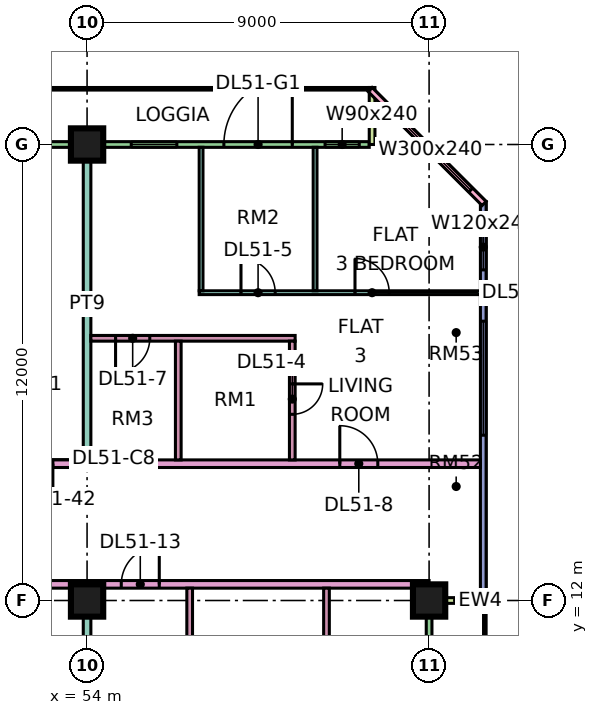
"""IFC4 building model, lengths in metres.
Left out: names, types, materials, properties, quantities, classifications, styles, units other than length and angle.
Written with IfcOpenShell. Run it as: python <this file> out.ifc"""

import sys

from ifc_helpers import new_model, si_unit, direction, frame, frame_2d, origin, origin_2d, place, context, subcontext, project, spatial, rectangle, extrude, element, fill, save


model = new_model("IFC4")
c1 = context("Model", 3, precision=1e-05, world=origin(), true_north=direction((0.0, 1.0)))
c2 = subcontext(c1, "Body", "Model", "MODEL_VIEW")
j1 = project(units=[si_unit("LENGTHUNIT", "METRE"), si_unit("PLANEANGLEUNIT", "RADIAN")], contexts=[c1])
p1 = place(None, origin())
s1 = spatial("IfcSite", under=j1, at=p1, CompositionType="ELEMENT")
p2 = place(p1, origin())
s2 = spatial("IfcBuilding", under=s1, at=p2, CompositionType="ELEMENT")
p3 = place(p2, frame((0.0, 0.0, 219.15)))
s3 = spatial("IfcBuildingStorey", under=s2, at=p3, CompositionType="ELEMENT", Elevation=219.15)
for number, where, z_axis, x_axis in (
    (1, (54.0, 12.0, 0.0), (0.0, 0.0, 1.0), (1.0, 0.0, 0.0)),
    (2, (54.0, 24.0, 0.0), (0.0, 0.0, 1.0), (1.0, 0.0, 0.0)),
    (3, (63.0, 12.0, 0.0), (0.0, 0.0, 1.0), (1.0, 0.0, 0.0)),
):
    element("IfcColumn", number, at=place(p3, frame(where, z_axis=z_axis, x_axis=x_axis)), inside=s3, PredefinedType="COLUMN", context=c2, shape_type="SweptSolid", body=[
        extrude(rectangle(XDim=0.85, YDim=0.85, at=origin_2d()), origin(), (0.0, 0.0, 1.0), 3.75),
    ])
p4 = place(p3, frame((61.425, 24.0, 0.0), z_axis=(0.0, 0.0, 1.0), x_axis=(-1.0, 0.0, 0.0)))
e4 = element("IfcWall", 4, at=p4, inside=s3, PredefinedType="SOLIDWALL", context=c2, shape_type="SweptSolid", body=[
    extrude(rectangle(XDim=13.35, YDim=0.15, at=frame_2d((6.675, 0.0))), origin(), (0.0, 0.0, 1.0), 3.35),
])
p5 = place(p4, frame((0.262, 0.0, 0.45)))
e5 = element("IfcOpeningElement", 5, at=p5, cuts=e4, PredefinedType="OPENING", context=c2, shape_type="SweptSolid", body=[
    extrude(rectangle(XDim=0.9, YDim=2.4, at=frame_2d((0.45, 1.2))), frame((0.0, 0.085, 0.0), z_axis=(0.0, -1.0, 0.0), x_axis=(1.0, 0.0, 0.0)), (0.0, 0.0, 1.0), 0.17),
])
p6 = place(p4, frame((2.025, 0.0, 0.0)))
e6 = element("IfcOpeningElement", 6, at=p6, cuts=e4, PredefinedType="OPENING", context=c2, shape_type="SweptSolid", body=[
    extrude(rectangle(XDim=1.8, YDim=2.4, at=frame_2d((0.9, 1.2))), frame((0.0, 0.085, 0.0), z_axis=(0.0, -1.0, 0.0), x_axis=(1.0, 0.0, 0.0)), (0.0, 0.0, 1.0), 0.17),
])
p7 = place(p4, frame((5.062, 0.0, 0.45)))
e7 = element("IfcOpeningElement", 7, at=p7, cuts=e4, PredefinedType="OPENING", context=c2, shape_type="SweptSolid", body=[
    extrude(rectangle(XDim=1.2, YDim=2.4, at=frame_2d((0.6, 1.2))), frame((0.0, 0.085, 0.0), z_axis=(0.0, -1.0, 0.0), x_axis=(1.0, 0.0, 0.0)), (0.0, 0.0, 1.0), 0.17),
])
p8 = place(p4, frame((8.55, 0.0, 0.45)))
e8 = element("IfcOpeningElement", 8, at=p8, cuts=e4, PredefinedType="OPENING", context=c2, shape_type="SweptSolid", body=[
    extrude(rectangle(XDim=4.2, YDim=2.4, at=frame_2d((2.1, 1.2))), frame((0.0, 0.085, 0.0), z_axis=(0.0, -1.0, 0.0), x_axis=(1.0, 0.0, 0.0)), (0.0, 0.0, 1.0), 0.17),
])
p9 = place(p3, frame((61.5, 25.5, 0.0), z_axis=(0.0, 0.0, 1.0), x_axis=(0.0, -1.0, 0.0)))
e9 = element("IfcWall", 9, at=p9, inside=s3, PredefinedType="SOLIDWALL", context=c2, shape_type="SweptSolid", body=[
    extrude(rectangle(XDim=1.5, YDim=0.15, at=frame_2d((0.75, 0.0))), origin(), (0.0, 0.0, 1.0), 3.35),
])
p10 = place(p3, frame((63.0, 1.575, 0.0), z_axis=(0.0, 0.0, 1.0), x_axis=(0.0, 1.0, 0.0)))
e10 = element("IfcWall", 10, at=p10, inside=s3, PredefinedType="SOLIDWALL", context=c2, shape_type="SweptSolid", body=[
    extrude(rectangle(XDim=10.35, YDim=0.15, at=frame_2d((5.175, 0.0))), origin(), (0.0, 0.0, 1.0), 3.35),
])
p11 = place(p10, frame((1.825, 0.0, 0.0)))
e11 = element("IfcOpeningElement", 11, at=p11, cuts=e10, PredefinedType="OPENING", context=c2, shape_type="SweptSolid", body=[
    extrude(rectangle(XDim=1.8, YDim=2.4, at=frame_2d((0.9, 1.2))), frame((0.0, 0.085, 0.0), z_axis=(0.0, -1.0, 0.0), x_axis=(1.0, 0.0, 0.0)), (0.0, 0.0, 1.0), 0.17),
])
p12 = place(p10, frame((7.075, 0.0, 0.45)))
e12 = element("IfcOpeningElement", 12, at=p12, cuts=e10, PredefinedType="OPENING", context=c2, shape_type="SweptSolid", body=[
    extrude(rectangle(XDim=2.4, YDim=2.4, at=frame_2d((1.2, 1.2))), frame((0.0, 0.085, 0.0), z_axis=(0.0, -1.0, 0.0), x_axis=(1.0, 0.0, 0.0)), (0.0, 0.0, 1.0), 0.17),
])
p13 = place(p3, frame((64.5, 12.0, 0.0), z_axis=(0.0, 0.0, 1.0), x_axis=(-1.0, 0.0, 0.0)))
e13 = element("IfcWall", 13, at=p13, inside=s3, PredefinedType="SOLIDWALL", context=c2, shape_type="SweptSolid", body=[
    extrude(rectangle(XDim=1.5, YDim=0.15, at=frame_2d((0.75, 0.0))), origin(), (0.0, 0.0, 1.0), 3.35),
])
p14 = place(p3, frame((64.425, 12.075, 0.0), z_axis=(0.0, 0.0, 1.0), x_axis=(0.0, 1.0, 0.0)))
e14 = element("IfcWall", 14, at=p14, inside=s3, PredefinedType="SOLIDWALL", context=c2, shape_type="SweptSolid", body=[
    extrude(rectangle(XDim=10.425, YDim=0.15, at=frame_2d((5.212, 0.0))), origin(), (0.0, 0.0, 1.0), 3.35),
])
p15 = place(p14, frame((4.275, 0.0, 0.45)))
e15 = element("IfcOpeningElement", 15, at=p15, cuts=e14, PredefinedType="OPENING", context=c2, shape_type="SweptSolid", body=[
    extrude(rectangle(XDim=3.0, YDim=2.4, at=frame_2d((1.5, 1.2))), frame((0.0, 0.085, 0.0), z_axis=(0.0, -1.0, 0.0), x_axis=(1.0, 0.0, 0.0)), (0.0, 0.0, 1.0), 0.17),
])
p16 = place(p14, frame((8.625, 0.0, 0.45)))
e16 = element("IfcOpeningElement", 16, at=p16, cuts=e14, PredefinedType="OPENING", context=c2, shape_type="SweptSolid", body=[
    extrude(rectangle(XDim=1.2, YDim=2.4, at=frame_2d((0.6, 1.2))), frame((0.0, 0.085, 0.0), z_axis=(0.0, -1.0, 0.0), x_axis=(1.0, 0.0, 0.0)), (0.0, 0.0, 1.0), 0.17),
])
p17 = place(p3, frame((64.447, 22.447, 0.0), z_axis=(0.0, 0.0, 1.0), x_axis=(-0.707106781187, 0.707106781187, 0.0)))
e17 = element("IfcWall", 17, at=p17, inside=s3, PredefinedType="SOLIDWALL", context=c2, shape_type="SweptSolid", body=[
    extrude(rectangle(XDim=4.243, YDim=0.15, at=frame_2d((2.121, 0.0))), origin(), (0.0, 0.0, 1.0), 3.35),
])
p18 = place(p17, frame((0.498, 0.0, 0.45)))
e18 = element("IfcOpeningElement", 18, at=p18, cuts=e17, PredefinedType="OPENING", context=c2, shape_type="SweptSolid", body=[
    extrude(rectangle(XDim=3.0, YDim=2.4, at=frame_2d((1.5, 1.2))), frame((0.0, 0.085, 0.0), z_axis=(0.0, -1.0, 0.0), x_axis=(1.0, 0.0, 0.0)), (0.0, 0.0, 1.0), 0.17),
])
p19 = place(p3, frame((40.65, 12.425, 0.0), z_axis=(0.0, 0.0, 1.0), x_axis=(1.0, 0.0, 0.0)))
e19 = element("IfcWall", 19, at=p19, inside=s3, PredefinedType="PARTITIONING", context=c2, shape_type="SweptSolid", body=[
    extrude(rectangle(XDim=22.35, YDim=0.2, at=frame_2d((11.175, 0.0))), origin(), (0.0, 0.0, 1.0), 3.35),
])
p20 = place(p19, frame((14.25, 0.0, 0.0)))
e20 = element("IfcOpeningElement", 20, at=p20, cuts=e19, PredefinedType="OPENING", context=c2, shape_type="SweptSolid", body=[
    extrude(rectangle(XDim=1.0, YDim=2.1, at=frame_2d((0.5, 1.05))), frame((0.0, 0.11, 0.0), z_axis=(0.0, -1.0, 0.0), x_axis=(1.0, 0.0, 0.0)), (0.0, 0.0, 1.0), 0.22),
])
p21 = place(p19, frame((1.05, 0.0, 0.0)))
e21 = element("IfcOpeningElement", 21, at=p21, cuts=e19, PredefinedType="OPENING", context=c2, shape_type="SweptSolid", body=[
    extrude(rectangle(XDim=1.0, YDim=2.1, at=frame_2d((0.5, 1.05))), frame((0.0, 0.11, 0.0), z_axis=(0.0, -1.0, 0.0), x_axis=(1.0, 0.0, 0.0)), (0.0, 0.0, 1.0), 0.22),
])
p22 = place(p3, frame((51.225, 15.6, 0.0), z_axis=(0.0, 0.0, 1.0), x_axis=(1.0, 0.0, 0.0)))
e22 = element("IfcWall", 22, at=p22, inside=s3, PredefinedType="PARTITIONING", context=c2, shape_type="SweptSolid", body=[
    extrude(rectangle(XDim=13.125, YDim=0.2, at=frame_2d((6.562, 0.0))), origin(), (0.0, 0.0, 1.0), 3.35),
])
p23 = place(p22, frame((9.425, 0.0, 0.0)))
e23 = element("IfcOpeningElement", 23, at=p23, cuts=e22, PredefinedType="OPENING", context=c2, shape_type="SweptSolid", body=[
    extrude(rectangle(XDim=1.0, YDim=2.1, at=frame_2d((0.5, 1.05))), frame((0.0, 0.11, 0.0), z_axis=(0.0, -1.0, 0.0), x_axis=(1.0, 0.0, 0.0)), (0.0, 0.0, 1.0), 0.22),
])
p24 = place(p22, frame((0.875, 0.0, 0.0)))
e24 = element("IfcOpeningElement", 24, at=p24, cuts=e22, PredefinedType="OPENING", context=c2, shape_type="SweptSolid", body=[
    extrude(rectangle(XDim=1.0, YDim=2.1, at=frame_2d((0.5, 1.05))), frame((0.0, 0.11, 0.0), z_axis=(0.0, -1.0, 0.0), x_axis=(1.0, 0.0, 0.0)), (0.0, 0.0, 1.0), 0.22),
])
p25 = place(p3, frame((54.0, 0.074, 0.0), z_axis=(0.0, 0.0, 1.0), x_axis=(0.0, 1.0, 0.0)))
e25 = element("IfcWall", 25, at=p25, inside=s3, PredefinedType="PARTITIONING", context=c2, shape_type="SweptSolid", body=[
    extrude(rectangle(XDim=12.251, YDim=0.2, at=frame_2d((6.125, 0.0))), origin(), (0.0, 0.0, 1.0), 3.35),
])
p26 = place(p3, frame((54.0, 15.7, 0.0), z_axis=(0.0, 0.0, 1.0), x_axis=(0.0, 1.0, 0.0)))
e26 = element("IfcWall", 26, at=p26, inside=s3, PredefinedType="PARTITIONING", context=c2, shape_type="SweptSolid", body=[
    extrude(rectangle(XDim=8.226, YDim=0.2, at=frame_2d((4.113, 0.0))), origin(), (0.0, 0.0, 1.0), 3.35),
])
p27 = place(p3, frame((54.1, 18.9, 0.0), z_axis=(0.0, 0.0, 1.0), x_axis=(1.0, 0.0, 0.0)))
e27 = element("IfcWall", 27, at=p27, inside=s3, PredefinedType="PARTITIONING", context=c2, shape_type="SweptSolid", body=[
    extrude(rectangle(XDim=5.375, YDim=0.15, at=frame_2d((2.688, 0.0))), origin(), (0.0, 0.0, 1.0), 3.35),
])
p28 = place(p27, frame((0.65, 0.0, 0.0)))
e28 = element("IfcOpeningElement", 28, at=p28, cuts=e27, PredefinedType="OPENING", context=c2, shape_type="SweptSolid", body=[
    extrude(rectangle(XDim=0.9, YDim=2.1, at=frame_2d((0.45, 1.05))), frame((0.0, 0.085, 0.0), z_axis=(0.0, -1.0, 0.0), x_axis=(1.0, 0.0, 0.0)), (0.0, 0.0, 1.0), 0.17),
])
p29 = place(p3, frame((56.4, 15.7, 0.0), z_axis=(0.0, 0.0, 1.0), x_axis=(0.0, 1.0, 0.0)))
e29 = element("IfcWall", 29, at=p29, inside=s3, PredefinedType="PARTITIONING", context=c2, shape_type="SweptSolid", body=[
    extrude(rectangle(XDim=3.125, YDim=0.15, at=frame_2d((1.562, 0.0))), origin(), (0.0, 0.0, 1.0), 3.35),
])
p30 = place(p3, frame((56.7, 8.3, 0.0), z_axis=(0.0, 0.0, 1.0), x_axis=(0.0, 1.0, 0.0)))
e30 = element("IfcWall", 30, at=p30, inside=s3, PredefinedType="PARTITIONING", context=c2, shape_type="SweptSolid", body=[
    extrude(rectangle(XDim=4.025, YDim=0.15, at=frame_2d((2.012, 0.0))), origin(), (0.0, 0.0, 1.0), 3.35),
])
p31 = place(p3, frame((56.95, 20.1, 0.0), z_axis=(0.0, 0.0, 1.0), x_axis=(1.0, 0.0, 0.0)))
e31 = element("IfcWall", 31, at=p31, inside=s3, PredefinedType="PARTITIONING", context=c2, shape_type="SweptSolid", body=[
    extrude(rectangle(XDim=7.4, YDim=0.1, at=frame_2d((3.7, 0.0))), origin(), (0.0, 0.0, 1.0), 3.35),
])
p32 = place(p31, frame((1.1, 0.0, 0.0)))
e32 = element("IfcOpeningElement", 32, at=p32, cuts=e31, PredefinedType="OPENING", context=c2, shape_type="SweptSolid", body=[
    extrude(rectangle(XDim=0.9, YDim=2.1, at=frame_2d((0.45, 1.05))), frame((0.0, 0.06, 0.0), z_axis=(0.0, -1.0, 0.0), x_axis=(1.0, 0.0, 0.0)), (0.0, 0.0, 1.0), 0.12),
])
p33 = place(p31, frame((4.1, 0.0, 0.0)))
e33 = element("IfcOpeningElement", 33, at=p33, cuts=e31, PredefinedType="OPENING", context=c2, shape_type="SweptSolid", body=[
    extrude(rectangle(XDim=0.9, YDim=2.1, at=frame_2d((0.45, 1.05))), frame((0.0, 0.06, 0.0), z_axis=(0.0, -1.0, 0.0), x_axis=(1.0, 0.0, 0.0)), (0.0, 0.0, 1.0), 0.12),
])
p34 = place(p3, frame((57.0, 20.15, 0.0), z_axis=(0.0, 0.0, 1.0), x_axis=(0.0, 1.0, 0.0)))
e34 = element("IfcWall", 34, at=p34, inside=s3, PredefinedType="PARTITIONING", context=c2, shape_type="SweptSolid", body=[
    extrude(rectangle(XDim=3.776, YDim=0.1, at=frame_2d((1.888, 0.0))), origin(), (0.0, 0.0, 1.0), 3.35),
])
p35 = place(p3, frame((59.4, 15.7, 0.0), z_axis=(0.0, 0.0, 1.0), x_axis=(0.0, 1.0, 0.0)))
e35 = element("IfcWall", 35, at=p35, inside=s3, PredefinedType="PARTITIONING", context=c2, shape_type="SweptSolid", body=[
    extrude(rectangle(XDim=3.125, YDim=0.15, at=frame_2d((1.562, 0.0))), origin(), (0.0, 0.0, 1.0), 3.35),
])
p36 = place(p35, frame((1.2, 0.0, 0.0)))
e36 = element("IfcOpeningElement", 36, at=p36, cuts=e35, PredefinedType="OPENING", context=c2, shape_type="SweptSolid", body=[
    extrude(rectangle(XDim=0.8, YDim=2.1, at=frame_2d((0.4, 1.05))), frame((0.0, 0.085, 0.0), z_axis=(0.0, -1.0, 0.0), x_axis=(1.0, 0.0, 0.0)), (0.0, 0.0, 1.0), 0.17),
])
p37 = place(p3, frame((60.0, 20.15, 0.0), z_axis=(0.0, 0.0, 1.0), x_axis=(0.0, 1.0, 0.0)))
e37 = element("IfcWall", 37, at=p37, inside=s3, PredefinedType="PARTITIONING", context=c2, shape_type="SweptSolid", body=[
    extrude(rectangle(XDim=3.776, YDim=0.1, at=frame_2d((1.888, 0.0))), origin(), (0.0, 0.0, 1.0), 3.35),
])
p38 = place(p3, frame((60.3, 8.3, 0.0), z_axis=(0.0, 0.0, 1.0), x_axis=(0.0, 1.0, 0.0)))
e38 = element("IfcWall", 38, at=p38, inside=s3, PredefinedType="PARTITIONING", context=c2, shape_type="SweptSolid", body=[
    extrude(rectangle(XDim=4.025, YDim=0.15, at=frame_2d((2.012, 0.0))), origin(), (0.0, 0.0, 1.0), 3.35),
])
p39 = place(p5, origin())
e39 = element("IfcWindow", 39, at=p39, inside=s3, PartitioningType="SINGLE_PANEL", PredefinedType="WINDOW", context=c2, shape_type="SweptSolid", body=[
    extrude(rectangle(XDim=0.9, YDim=2.4, at=frame_2d((0.45, 1.2))), frame((0.0, 0.03, 0.0), z_axis=(0.0, -1.0, 0.0), x_axis=(1.0, 0.0, 0.0)), (0.0, 0.0, 1.0), 0.06),
])
fill(e5, e39)
p40 = place(p6, frame((1.8, 0.0, 0.0), z_axis=(0.0, 0.0, 1.0), x_axis=(-1.0, 0.0, 0.0)))
e40 = element("IfcDoor", 40, at=p40, inside=s3, OperationType="DOUBLE_DOOR_SINGLE_SWING", PredefinedType="DOOR", context=c2, shape_type="SweptSolid", body=[
    extrude(rectangle(XDim=1.8, YDim=2.4, at=frame_2d((0.9, 1.2))), frame((0.0, 0.025, 0.0), z_axis=(0.0, -1.0, 0.0), x_axis=(1.0, 0.0, 0.0)), (0.0, 0.0, 1.0), 0.05),
])
fill(e6, e40)
p41 = place(p7, origin())
e41 = element("IfcWindow", 41, at=p41, inside=s3, PartitioningType="SINGLE_PANEL", PredefinedType="WINDOW", context=c2, shape_type="SweptSolid", body=[
    extrude(rectangle(XDim=1.2, YDim=2.4, at=frame_2d((0.6, 1.2))), frame((0.0, 0.03, 0.0), z_axis=(0.0, -1.0, 0.0), x_axis=(1.0, 0.0, 0.0)), (0.0, 0.0, 1.0), 0.06),
])
fill(e7, e41)
p42 = place(p15, origin())
e42 = element("IfcWindow", 42, at=p42, inside=s3, PartitioningType="SINGLE_PANEL", PredefinedType="WINDOW", context=c2, shape_type="SweptSolid", body=[
    extrude(rectangle(XDim=3.0, YDim=2.4, at=frame_2d((1.5, 1.2))), frame((0.0, 0.03, 0.0), z_axis=(0.0, -1.0, 0.0), x_axis=(1.0, 0.0, 0.0)), (0.0, 0.0, 1.0), 0.06),
])
fill(e15, e42)
p43 = place(p16, origin())
e43 = element("IfcWindow", 43, at=p43, inside=s3, PartitioningType="SINGLE_PANEL", PredefinedType="WINDOW", context=c2, shape_type="SweptSolid", body=[
    extrude(rectangle(XDim=1.2, YDim=2.4, at=frame_2d((0.6, 1.2))), frame((0.0, 0.03, 0.0), z_axis=(0.0, -1.0, 0.0), x_axis=(1.0, 0.0, 0.0)), (0.0, 0.0, 1.0), 0.06),
])
fill(e16, e43)
p44 = place(p18, origin())
e44 = element("IfcWindow", 44, at=p44, inside=s3, PartitioningType="SINGLE_PANEL", PredefinedType="WINDOW", context=c2, shape_type="SweptSolid", body=[
    extrude(rectangle(XDim=3.0, YDim=2.4, at=frame_2d((1.5, 1.2))), frame((0.0, 0.03, 0.0), z_axis=(0.0, -1.0, 0.0), x_axis=(1.0, 0.0, 0.0)), (0.0, 0.0, 1.0), 0.06),
])
fill(e18, e44)
p45 = place(p36, origin())
e45 = element("IfcDoor", 45, at=p45, inside=s3, OperationType="SINGLE_SWING_RIGHT", PredefinedType="DOOR", context=c2, shape_type="SweptSolid", body=[
    extrude(rectangle(XDim=0.8, YDim=2.1, at=frame_2d((0.4, 1.05))), frame((0.0, 0.025, 0.0), z_axis=(0.0, -1.0, 0.0), x_axis=(1.0, 0.0, 0.0)), (0.0, 0.0, 1.0), 0.05),
])
fill(e36, e45)
p46 = place(p32, origin())
e46 = element("IfcDoor", 46, at=p46, inside=s3, OperationType="SINGLE_SWING_LEFT", PredefinedType="DOOR", context=c2, shape_type="SweptSolid", body=[
    extrude(rectangle(XDim=0.9, YDim=2.1, at=frame_2d((0.45, 1.05))), frame((0.0, 0.025, 0.0), z_axis=(0.0, -1.0, 0.0), x_axis=(1.0, 0.0, 0.0)), (0.0, 0.0, 1.0), 0.05),
])
fill(e32, e46)
p47 = place(p33, origin())
e47 = element("IfcDoor", 47, at=p47, inside=s3, OperationType="SINGLE_SWING_LEFT", PredefinedType="DOOR", context=c2, shape_type="SweptSolid", body=[
    extrude(rectangle(XDim=0.9, YDim=2.1, at=frame_2d((0.45, 1.05))), frame((0.0, 0.025, 0.0), z_axis=(0.0, -1.0, 0.0), x_axis=(1.0, 0.0, 0.0)), (0.0, 0.0, 1.0), 0.05),
])
fill(e33, e47)
p48 = place(p28, frame((0.9, 0.0, 0.0), z_axis=(0.0, 0.0, 1.0), x_axis=(-1.0, 0.0, 0.0)))
e48 = element("IfcDoor", 48, at=p48, inside=s3, OperationType="SINGLE_SWING_LEFT", PredefinedType="DOOR", context=c2, shape_type="SweptSolid", body=[
    extrude(rectangle(XDim=0.9, YDim=2.1, at=frame_2d((0.45, 1.05))), frame((0.0, 0.025, 0.0), z_axis=(0.0, -1.0, 0.0), x_axis=(1.0, 0.0, 0.0)), (0.0, 0.0, 1.0), 0.05),
])
fill(e28, e48)
p49 = place(p23, origin())
e49 = element("IfcDoor", 49, at=p49, inside=s3, OperationType="SINGLE_SWING_LEFT", PredefinedType="DOOR", context=c2, shape_type="SweptSolid", body=[
    extrude(rectangle(XDim=1.0, YDim=2.1, at=frame_2d((0.5, 1.05))), frame((0.0, 0.025, 0.0), z_axis=(0.0, -1.0, 0.0), x_axis=(1.0, 0.0, 0.0)), (0.0, 0.0, 1.0), 0.05),
])
fill(e23, e49)
p50 = place(p20, frame((1.0, 0.0, 0.0), z_axis=(0.0, 0.0, 1.0), x_axis=(-1.0, 0.0, 0.0)))
e50 = element("IfcDoor", 50, at=p50, inside=s3, OperationType="SINGLE_SWING_RIGHT", PredefinedType="DOOR", context=c2, shape_type="SweptSolid", body=[
    extrude(rectangle(XDim=1.0, YDim=2.1, at=frame_2d((0.5, 1.05))), frame((0.0, 0.025, 0.0), z_axis=(0.0, -1.0, 0.0), x_axis=(1.0, 0.0, 0.0)), (0.0, 0.0, 1.0), 0.05),
])
fill(e20, e50)
p51 = place(p24, origin())
e51 = element("IfcDoor", 51, at=p51, inside=s3, OperationType="SINGLE_SWING_RIGHT", PredefinedType="DOOR", context=c2, shape_type="SweptSolid", body=[
    extrude(rectangle(XDim=1.0, YDim=2.1, at=frame_2d((0.5, 1.05))), frame((0.0, 0.025, 0.0), z_axis=(0.0, -1.0, 0.0), x_axis=(1.0, 0.0, 0.0)), (0.0, 0.0, 1.0), 0.05),
])
fill(e24, e51)
save(model, sys.argv[1])
